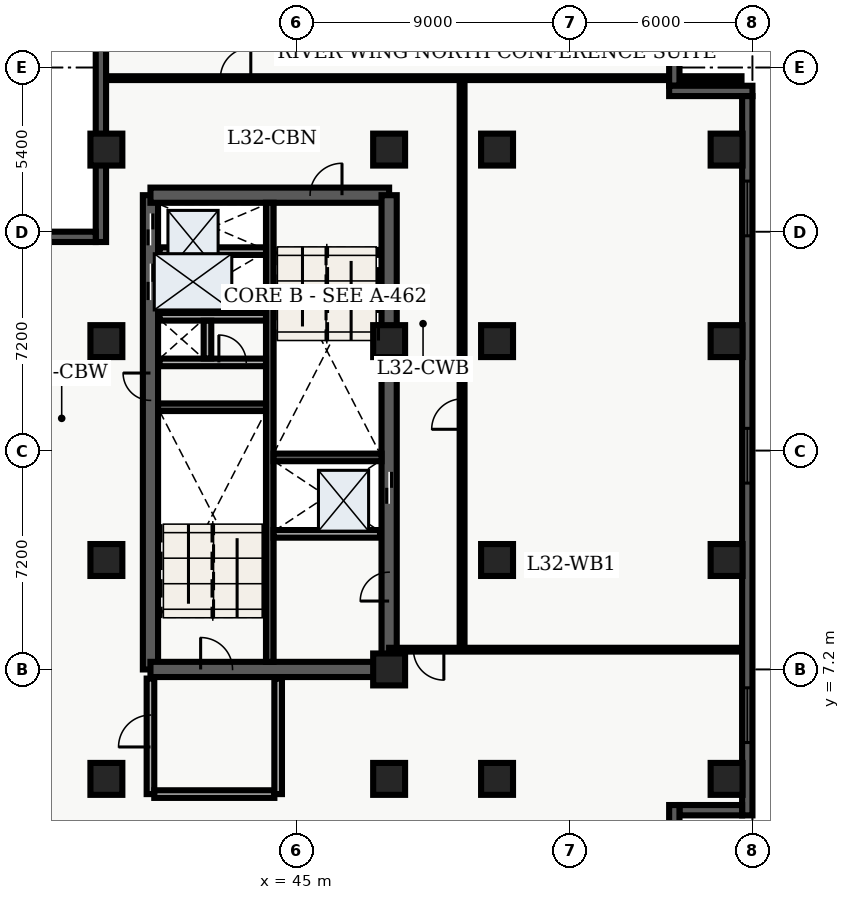
"""IFC4 building model, lengths in metres.
Left out: names, types, materials, properties, quantities, classifications, styles, units other than length and angle.
Written with IfcOpenShell. Run it as: python <this file> out.ifc"""

import sys

from ifc_helpers import new_model, entity, si_unit, converted_unit, direction, frame, origin_with_axes, origin_2d_with_axis, place, context, subcontext, project, spatial, polyline, rectangle, outline, extrude, element, fill, save


model = new_model("IFC4")
c1 = context("Model", 3, precision=1e-05, world=origin_with_axes(), true_north=direction((0.0, 1.0)))
c2 = subcontext(c1, "Body", "Model", "MODEL_VIEW")
j1 = project(units=[si_unit("LENGTHUNIT", "METRE"), converted_unit("PLANEANGLEUNIT", "DEGREE", entity("IfcPlaneAngleMeasure", 0.017), si_unit("PLANEANGLEUNIT", "RADIAN"), dimensions=[0, 0, 0, 0, 0, 0, 0])], contexts=[c1])
p1 = place(None, origin_with_axes())
s1 = spatial("IfcSite", under=j1, at=p1, CompositionType="ELEMENT")
p2 = place(p1, origin_with_axes())
s2 = spatial("IfcBuilding", under=s1, at=p2, CompositionType="ELEMENT")
p3 = place(p2, frame((0.0, 0.0, 132.9), z_axis=(0.0, 0.0, 1.0), x_axis=(1.0, 0.0, 0.0)))
s3 = spatial("IfcBuildingStorey", under=s2, at=p3, CompositionType="ELEMENT", Elevation=132.9)
p4 = place(p3, frame((40.2, 7.2, 0.0), z_axis=(0.0, 0.0, 1.0), x_axis=(0.0, 1.0, 0.0)))
e1 = element("IfcWall", 1, at=p4, inside=s3, PredefinedType="SHEAR", context=c2, shape_type="SweptSolid", body=[
    extrude(outline(polyline([(0.0, -0.25), (15.6, -0.25), (15.6, 0.25), (0.0, 0.25), (0.0, -0.25)])), origin_with_axes(), (0.0, 0.0, 1.0), 3.66),
])
p5 = place(p4, frame((14.475, 0.0, 0.0), z_axis=(0.0, 0.0, 1.0), x_axis=(1.0, 0.0, 0.0)))
e2 = element("IfcOpeningElement", 2, at=p5, cuts=e1, PredefinedType="OPENING", context=c2, shape_type="SweptSolid", body=[
    extrude(rectangle(XDim=1.05, YDim=0.52, at=origin_2d_with_axis()), origin_with_axes(), (0.0, 0.0, 1.0), 2.15),
])
p6 = place(p4, frame((12.75, 0.0, 0.0), z_axis=(0.0, 0.0, 1.0), x_axis=(1.0, 0.0, 0.0)))
e3 = element("IfcOpeningElement", 3, at=p6, cuts=e1, PredefinedType="OPENING", context=c2, shape_type="SweptSolid", body=[
    extrude(rectangle(XDim=1.2, YDim=0.52, at=origin_2d_with_axis()), origin_with_axes(), (0.0, 0.0, 1.0), 2.15),
])
p7 = place(p4, frame((9.3, 0.0, 0.0), z_axis=(0.0, 0.0, 1.0), x_axis=(1.0, 0.0, 0.0)))
e4 = element("IfcOpeningElement", 4, at=p7, cuts=e1, PredefinedType="OPENING", context=c2, shape_type="SweptSolid", body=[
    extrude(rectangle(XDim=0.9, YDim=0.52, at=origin_2d_with_axis()), origin_with_axes(), (0.0, 0.0, 1.0), 2.15),
])
p8 = place(p3, frame((40.2, 7.2, 0.0), z_axis=(0.0, 0.0, 1.0), x_axis=(1.0, 0.0, 0.0)))
e5 = element("IfcWall", 5, at=p8, inside=s3, PredefinedType="SHEAR", context=c2, shape_type="SweptSolid", body=[
    extrude(outline(polyline([(0.0, -0.25), (7.85, -0.25), (7.85, 0.25), (0.0, 0.25), (0.0, -0.25)])), origin_with_axes(), (0.0, 0.0, 1.0), 3.66),
])
p9 = place(p8, frame((2.175, 0.0, 0.0), z_axis=(0.0, 0.0, 1.0), x_axis=(1.0, 0.0, 0.0)))
e6 = element("IfcOpeningElement", 6, at=p9, cuts=e5, PredefinedType="OPENING", context=c2, shape_type="SweptSolid", body=[
    extrude(rectangle(XDim=1.05, YDim=0.52, at=origin_2d_with_axis()), origin_with_axes(), (0.0, 0.0, 1.0), 2.15),
])
p10 = place(p3, frame((40.2, 22.8, 0.0), z_axis=(0.0, 0.0, 1.0), x_axis=(1.0, 0.0, 0.0)))
e7 = element("IfcWall", 7, at=p10, inside=s3, PredefinedType="SHEAR", context=c2, shape_type="SweptSolid", body=[
    extrude(outline(polyline([(0.0, -0.25), (7.85, -0.25), (7.85, 0.25), (0.0, 0.25), (0.0, -0.25)])), origin_with_axes(), (0.0, 0.0, 1.0), 3.66),
])
p11 = place(p10, frame((5.775, 0.0, 0.0), z_axis=(0.0, 0.0, 1.0), x_axis=(1.0, 0.0, 0.0)))
e8 = element("IfcOpeningElement", 8, at=p11, cuts=e7, PredefinedType="OPENING", context=c2, shape_type="SweptSolid", body=[
    extrude(rectangle(XDim=1.05, YDim=0.52, at=origin_2d_with_axis()), origin_with_axes(), (0.0, 0.0, 1.0), 2.15),
])
p12 = place(p3, frame((48.05, 7.2, 0.0), z_axis=(0.0, 0.0, 1.0), x_axis=(0.0, 1.0, 0.0)))
e9 = element("IfcWall", 9, at=p12, inside=s3, PredefinedType="SHEAR", context=c2, shape_type="SweptSolid", body=[
    extrude(outline(polyline([(0.0, -0.25), (15.6, -0.25), (15.6, 0.25), (0.0, 0.25), (0.0, -0.25)])), origin_with_axes(), (0.0, 0.0, 1.0), 3.66),
])
p13 = place(p12, frame((5.975, 0.0, 0.0), z_axis=(0.0, 0.0, 1.0), x_axis=(1.0, 0.0, 0.0)))
e10 = element("IfcOpeningElement", 10, at=p13, cuts=e9, PredefinedType="OPENING", context=c2, shape_type="SweptSolid", body=[
    extrude(rectangle(XDim=1.05, YDim=0.52, at=origin_2d_with_axis()), origin_with_axes(), (0.0, 0.0, 1.0), 2.15),
])
p14 = place(p12, frame((2.725, 0.0, 0.0), z_axis=(0.0, 0.0, 1.0), x_axis=(1.0, 0.0, 0.0)))
e11 = element("IfcOpeningElement", 11, at=p14, cuts=e9, PredefinedType="OPENING", context=c2, shape_type="SweptSolid", body=[
    extrude(rectangle(XDim=0.95, YDim=0.52, at=origin_2d_with_axis()), origin_with_axes(), (0.0, 0.0, 1.0), 2.15),
])
p15 = place(p3, frame((44.125, 7.45, 0.0), z_axis=(0.0, 0.0, 1.0), x_axis=(0.0, 1.0, 0.0)))
e12 = element("IfcWall", 12, at=p15, inside=s3, PredefinedType="SHEAR", context=c2, shape_type="SweptSolid", body=[
    extrude(outline(polyline([(0.0, -0.125), (15.1, -0.125), (15.1, 0.125), (0.0, 0.125), (0.0, -0.125)])), origin_with_axes(), (0.0, 0.0, 1.0), 3.66),
])
for number, where, z_axis, x_axis in (
    (13, (40.45, 15.825, 0.0), (0.0, 0.0, 1.0), (1.0, 0.0, 0.0)),
    (14, (44.25, 14.175, 0.0), (0.0, 0.0, 1.0), (1.0, 0.0, 0.0)),
):
    element("IfcWall", number, at=place(p3, frame(where, z_axis=z_axis, x_axis=x_axis)), inside=s3, PredefinedType="SHEAR", context=c2, shape_type="SweptSolid", body=[
        extrude(outline(polyline([(0.0, -0.125), (3.55, -0.125), (3.55, 0.125), (0.0, 0.125), (0.0, -0.125)])), origin_with_axes(), (0.0, 0.0, 1.0), 3.66),
    ])
p16 = place(p3, frame((40.5, 17.3, 0.0), z_axis=(0.0, 0.0, 1.0), x_axis=(1.0, 0.0, 0.0)))
e15 = element("IfcWall", 15, at=p16, inside=s3, PredefinedType="SOLIDWALL", context=c2, shape_type="SweptSolid", body=[
    extrude(outline(polyline([(0.0, -0.125), (3.5, -0.125), (3.5, 0.125), (0.0, 0.125), (0.0, -0.125)])), origin_with_axes(), (0.0, 0.0, 1.0), 2.7),
])
p17 = place(p16, frame((2.4, 0.0, 0.0), z_axis=(0.0, 0.0, 1.0), x_axis=(1.0, 0.0, 0.0)))
e16 = element("IfcOpeningElement", 16, at=p17, cuts=e15, PredefinedType="OPENING", context=c2, shape_type="SweptSolid", body=[
    extrude(rectangle(XDim=0.9, YDim=0.27, at=origin_2d_with_axis()), origin_with_axes(), (0.0, 0.0, 1.0), 2.15),
])
p18 = place(p3, frame((40.5, 18.8, 0.0), z_axis=(0.0, 0.0, 1.0), x_axis=(1.0, 0.0, 0.0)))
e17 = element("IfcWall", 17, at=p18, inside=s3, PredefinedType="SOLIDWALL", context=c2, shape_type="SweptSolid", body=[
    extrude(outline(polyline([(0.0, -0.125), (3.5, -0.125), (3.5, 0.125), (0.0, 0.125), (0.0, -0.125)])), origin_with_axes(), (0.0, 0.0, 1.0), 2.7),
])
p19 = place(p3, frame((42.075, 17.43, 0.0), z_axis=(0.0, 0.0, 1.0), x_axis=(0.0, 1.0, 0.0)))
e18 = element("IfcWall", 18, at=p19, inside=s3, PredefinedType="SOLIDWALL", context=c2, shape_type="SweptSolid", body=[
    extrude(outline(polyline([(0.0, -0.125), (1.24, -0.125), (1.24, 0.125), (0.0, 0.125), (0.0, -0.125)])), origin_with_axes(), (0.0, 0.0, 1.0), 2.7),
])
p20 = place(p3, frame((40.2, 3.1, 0.0), z_axis=(0.0, 0.0, 1.0), x_axis=(0.0, 1.0, 0.0)))
e19 = element("IfcWall", 19, at=p20, inside=s3, PredefinedType="SOLIDWALL", context=c2, shape_type="SweptSolid", body=[
    extrude(outline(polyline([(0.0, -0.125), (3.8, -0.125), (3.8, 0.125), (0.0, 0.125), (0.0, -0.125)])), origin_with_axes(), (0.0, 0.0, 1.0), 2.7),
])
p21 = place(p20, frame((2.075, 0.0, 0.0), z_axis=(0.0, 0.0, 1.0), x_axis=(1.0, 0.0, 0.0)))
e20 = element("IfcOpeningElement", 20, at=p21, cuts=e19, PredefinedType="OPENING", context=c2, shape_type="SweptSolid", body=[
    extrude(rectangle(XDim=1.05, YDim=0.27, at=origin_2d_with_axis()), origin_with_axes(), (0.0, 0.0, 1.0), 2.15),
])
p22 = place(p3, frame((40.325, 3.1, 0.0), z_axis=(0.0, 0.0, 1.0), x_axis=(1.0, 0.0, 0.0)))
e21 = element("IfcWall", 21, at=p22, inside=s3, PredefinedType="SOLIDWALL", context=c2, shape_type="SweptSolid", body=[
    extrude(outline(polyline([(0.0, -0.125), (3.95, -0.125), (3.95, 0.125), (0.0, 0.125), (0.0, -0.125)])), origin_with_axes(), (0.0, 0.0, 1.0), 2.7),
])
p23 = place(p3, frame((44.4, 3.1, 0.0), z_axis=(0.0, 0.0, 1.0), x_axis=(0.0, 1.0, 0.0)))
e22 = element("IfcWall", 22, at=p23, inside=s3, PredefinedType="SOLIDWALL", context=c2, shape_type="SweptSolid", body=[
    extrude(outline(polyline([(0.0, -0.125), (3.8, -0.125), (3.8, 0.125), (0.0, 0.125), (0.0, -0.125)])), origin_with_axes(), (0.0, 0.0, 1.0), 2.7),
])
for number, where, z_axis, x_axis in (
    (23, (38.75, 3.6, 0.0), (0.0, 0.0, 1.0), (1.0, 0.0, 0.0)),
    (24, (38.75, 10.8, 0.0), (0.0, 0.0, 1.0), (1.0, 0.0, 0.0)),
    (25, (38.75, 18.0, 0.0), (0.0, 0.0, 1.0), (1.0, 0.0, 0.0)),
    (26, (38.75, 24.3, 0.0), (0.0, 0.0, 1.0), (1.0, 0.0, 0.0)),
    (27, (48.05, 3.6, 0.0), (0.0, 0.0, 1.0), (1.0, 0.0, 0.0)),
    (28, (48.05, 7.2, 0.0), (0.0, 0.0, 1.0), (1.0, 0.0, 0.0)),
    (29, (48.05, 18.0, 0.0), (0.0, 0.0, 1.0), (1.0, 0.0, 0.0)),
    (30, (48.05, 24.3, 0.0), (0.0, 0.0, 1.0), (1.0, 0.0, 0.0)),
    (31, (51.6, 3.6, 0.0), (0.0, 0.0, 1.0), (1.0, 0.0, 0.0)),
    (32, (51.6, 10.8, 0.0), (0.0, 0.0, 1.0), (1.0, 0.0, 0.0)),
    (33, (51.6, 18.0, 0.0), (0.0, 0.0, 1.0), (1.0, 0.0, 0.0)),
    (34, (51.6, 24.3, 0.0), (0.0, 0.0, 1.0), (1.0, 0.0, 0.0)),
    (35, (59.15, 3.6, 0.0), (0.0, 0.0, 1.0), (1.0, 0.0, 0.0)),
    (36, (59.15, 10.8, 0.0), (0.0, 0.0, 1.0), (1.0, 0.0, 0.0)),
    (37, (59.15, 18.0, 0.0), (0.0, 0.0, 1.0), (1.0, 0.0, 0.0)),
    (38, (59.15, 24.3, 0.0), (0.0, 0.0, 1.0), (1.0, 0.0, 0.0)),
):
    element("IfcColumn", number, at=place(p3, frame(where, z_axis=z_axis, x_axis=x_axis)), inside=s3, PredefinedType="COLUMN", context=c2, shape_type="SweptSolid", body=[
        extrude(rectangle(XDim=1.05, YDim=1.05, at=origin_2d_with_axis()), origin_with_axes(), (0.0, 0.0, 1.0), 3.9),
    ])
for number, where, z_axis, x_axis in (
    (39, (40.5, 20.96, 0.0), (0.0, 0.0, 1.0), (1.0, 0.0, 0.0)),
    (40, (44.25, 11.66, 0.0), (0.0, 0.0, 1.0), (1.0, 0.0, 0.0)),
):
    element("IfcWall", number, at=place(p3, frame(where, z_axis=z_axis, x_axis=x_axis)), inside=s3, PredefinedType="SOLIDWALL", context=c2, shape_type="SweptSolid", body=[
        extrude(outline(polyline([(0.0, -0.125), (3.5, -0.125), (3.5, 0.125), (0.0, 0.125), (0.0, -0.125)])), origin_with_axes(), (0.0, 0.0, 1.0), 2.7),
    ])
p24 = place(p3, frame((50.45, 7.85, 0.0), z_axis=(0.0, 0.0, 1.0), x_axis=(0.0, 1.0, 0.0)))
e41 = element("IfcWall", 41, at=p24, inside=s3, PredefinedType="PARTITIONING", context=c2, shape_type="SweptSolid", body=[
    extrude(outline(polyline([(0.0, -0.08), (18.8, -0.08), (18.8, 0.08), (0.0, 0.08), (0.0, -0.08)])), origin_with_axes(), (0.0, 0.0, 1.0), 2.7),
])
p25 = place(p24, frame((7.75, 0.0, 0.0), z_axis=(0.0, 0.0, 1.0), x_axis=(1.0, 0.0, 0.0)))
e42 = element("IfcOpeningElement", 42, at=p25, cuts=e41, PredefinedType="OPENING", context=c2, shape_type="SweptSolid", body=[
    extrude(rectangle(XDim=1.0, YDim=0.18, at=origin_2d_with_axis()), origin_with_axes(), (0.0, 0.0, 1.0), 2.15),
])
p26 = place(p3, frame((59.665, 7.85, 0.0), z_axis=(0.0, 0.0, 1.0), x_axis=(-1.0, 0.0, 0.0)))
e43 = element("IfcWall", 43, at=p26, inside=s3, PredefinedType="PARTITIONING", context=c2, shape_type="SweptSolid", body=[
    extrude(outline(polyline([(0.0, -0.062), (11.615, -0.062), (11.615, 0.062), (0.0, 0.062), (0.0, -0.062)])), origin_with_axes(), (0.0, 0.0, 1.0), 2.7),
])
p27 = place(p26, frame((10.315, 0.0, 0.0), z_axis=(0.0, 0.0, 1.0), x_axis=(1.0, 0.0, 0.0)))
e44 = element("IfcOpeningElement", 44, at=p27, cuts=e43, PredefinedType="OPENING", context=c2, shape_type="SweptSolid", body=[
    extrude(rectangle(XDim=1.0, YDim=0.145, at=origin_2d_with_axis()), origin_with_axes(), (0.0, 0.0, 1.0), 2.15),
])
p28 = place(p3, frame((38.735, 26.65, 0.0), z_axis=(0.0, 0.0, 1.0), x_axis=(1.0, 0.0, 0.0)))
e45 = element("IfcWall", 45, at=p28, inside=s3, PredefinedType="PARTITIONING", context=c2, shape_type="SweptSolid", body=[
    extrude(outline(polyline([(0.0, -0.062), (20.905, -0.062), (20.905, 0.062), (0.0, 0.062), (0.0, -0.062)])), origin_with_axes(), (0.0, 0.0, 1.0), 2.7),
])
p29 = place(p28, frame((4.265, 0.0, 0.0), z_axis=(0.0, 0.0, 1.0), x_axis=(1.0, 0.0, 0.0)))
e46 = element("IfcOpeningElement", 46, at=p29, cuts=e45, PredefinedType="OPENING", context=c2, shape_type="SweptSolid", body=[
    extrude(rectangle(XDim=1.0, YDim=0.145, at=origin_2d_with_axis()), origin_with_axes(), (0.0, 0.0, 1.0), 2.15),
])
p30 = place(p3, frame((38.57, 21.26, 0.0), z_axis=(0.0, 0.0, 1.0), x_axis=(0.0, 1.0, 0.0)))
e47 = element("IfcWall", 47, at=p30, inside=s3, PredefinedType="SOLIDWALL", context=c2, shape_type="SweptSolid", body=[
    extrude(outline(polyline([(0.0, -0.17), (7.54, -0.17), (7.54, 0.17), (0.0, 0.17), (0.0, -0.17)])), origin_with_axes(), (0.0, 0.0, 1.0), 3.66),
])
p31 = place(p3, frame((57.43, 28.46, 0.0), z_axis=(0.0, 0.0, 1.0), x_axis=(0.0, -1.0, 0.0)))
e48 = element("IfcWall", 48, at=p31, inside=s3, PredefinedType="SOLIDWALL", context=c2, shape_type="SweptSolid", body=[
    extrude(outline(polyline([(0.0, -0.17), (2.06, -0.17), (2.06, 0.17), (0.0, 0.17), (0.0, -0.17)])), origin_with_axes(), (0.0, 0.0, 1.0), 3.66),
])
p32 = place(p3, frame((57.26, 26.23, 0.0), z_axis=(0.0, 0.0, 1.0), x_axis=(1.0, 0.0, 0.0)))
e49 = element("IfcWall", 49, at=p32, inside=s3, PredefinedType="SOLIDWALL", context=c2, shape_type="SweptSolid", body=[
    extrude(outline(polyline([(0.0, -0.17), (2.74, -0.17), (2.74, 0.17), (0.0, 0.17), (0.0, -0.17)])), origin_with_axes(), (0.0, 0.0, 1.0), 3.66),
])
p33 = place(p3, frame((59.83, 26.06, 0.0), z_axis=(0.0, 0.0, 1.0), x_axis=(0.0, -1.0, 0.0)))
e50 = element("IfcWall", 50, at=p33, inside=s3, PredefinedType="SOLIDWALL", context=c2, shape_type="SweptSolid", body=[
    extrude(outline(polyline([(0.0, -0.17), (23.66, -0.17), (23.66, 0.17), (0.0, 0.17), (0.0, -0.17)])), origin_with_axes(), (0.0, 0.0, 1.0), 3.66),
])
p34 = place(p33, frame((3.696, 0.0, 0.45), z_axis=(0.0, 0.0, 1.0), x_axis=(1.0, 0.0, 0.0)))
e51 = element("IfcOpeningElement", 51, at=p34, cuts=e50, PredefinedType="OPENING", context=c2, shape_type="SweptSolid", body=[
    extrude(rectangle(XDim=1.8, YDim=0.36, at=origin_2d_with_axis()), origin_with_axes(), (0.0, 0.0, 1.0), 2.1),
])
p35 = place(p33, frame((11.83, 0.0, 0.45), z_axis=(0.0, 0.0, 1.0), x_axis=(1.0, 0.0, 0.0)))
e52 = element("IfcOpeningElement", 52, at=p35, cuts=e50, PredefinedType="OPENING", context=c2, shape_type="SweptSolid", body=[
    extrude(rectangle(XDim=1.8, YDim=0.36, at=origin_2d_with_axis()), origin_with_axes(), (0.0, 0.0, 1.0), 2.1),
])
p36 = place(p33, frame((20.364, 0.0, 0.45), z_axis=(0.0, 0.0, 1.0), x_axis=(1.0, 0.0, 0.0)))
e53 = element("IfcOpeningElement", 53, at=p36, cuts=e50, PredefinedType="OPENING", context=c2, shape_type="SweptSolid", body=[
    extrude(rectangle(XDim=1.8, YDim=0.36, at=origin_2d_with_axis()), origin_with_axes(), (0.0, 0.0, 1.0), 2.1),
])
p37 = place(p3, frame((59.66, 2.57, 0.0), z_axis=(0.0, 0.0, 1.0), x_axis=(-1.0, 0.0, 0.0)))
e54 = element("IfcWall", 54, at=p37, inside=s3, PredefinedType="SOLIDWALL", context=c2, shape_type="SweptSolid", body=[
    extrude(outline(polyline([(0.0, -0.17), (2.06, -0.17), (2.06, 0.17), (0.0, 0.17), (0.0, -0.17)])), origin_with_axes(), (0.0, 0.0, 1.0), 3.66),
])
p38 = place(p3, frame((57.43, 2.74, 0.0), z_axis=(0.0, 0.0, 1.0), x_axis=(0.0, -1.0, 0.0)))
e55 = element("IfcWall", 55, at=p38, inside=s3, PredefinedType="SOLIDWALL", context=c2, shape_type="SweptSolid", body=[
    extrude(outline(polyline([(0.0, -0.17), (2.74, -0.17), (2.74, 0.17), (0.0, 0.17), (0.0, -0.17)])), origin_with_axes(), (0.0, 0.0, 1.0), 3.66),
])
p39 = place(p3, frame((21.364, 21.43, 0.0), z_axis=(0.0, 0.0, 1.0), x_axis=(1.0, 0.0, 0.0)))
e56 = element("IfcWall", 56, at=p39, inside=s3, PredefinedType="SOLIDWALL", context=c2, shape_type="SweptSolid", body=[
    extrude(outline(polyline([(0.0, -0.17), (17.036, -0.17), (17.036, 0.17), (0.0, 0.17), (0.0, -0.17)])), origin_with_axes(), (0.0, 0.0, 1.0), 3.66),
])
p40 = place(p39, frame((8.518, 0.0, 0.45), z_axis=(0.0, 0.0, 1.0), x_axis=(1.0, 0.0, 0.0)))
e57 = element("IfcOpeningElement", 57, at=p40, cuts=e56, PredefinedType="OPENING", context=c2, shape_type="SweptSolid", body=[
    extrude(rectangle(XDim=1.8, YDim=0.36, at=origin_2d_with_axis()), origin_with_axes(), (0.0, 0.0, 1.0), 2.1),
])
p41 = place(p39, frame((13.347, 0.0, 0.45), z_axis=(0.0, 0.0, 1.0), x_axis=(1.0, 0.0, 0.0)))
e58 = element("IfcOpeningElement", 58, at=p41, cuts=e56, PredefinedType="OPENING", context=c2, shape_type="SweptSolid", body=[
    extrude(rectangle(XDim=1.8, YDim=0.36, at=origin_2d_with_axis()), origin_with_axes(), (0.0, 0.0, 1.0), 2.1),
])
p42 = place(p12, frame((5.975, 0.0, 0.0), z_axis=(0.0, 0.0, 1.0), x_axis=(1.0, 0.0, 0.0)))
e59 = element("IfcDoor", 59, at=p42, inside=s3, OperationType="SLIDING_TO_LEFT", PredefinedType="DOOR", context=c2, shape_type="SweptSolid", body=[
    extrude(rectangle(XDim=1.05, YDim=0.09, at=origin_2d_with_axis()), origin_with_axes(), (0.0, 0.0, 1.0), 2.15),
])
fill(e10, e59)
p43 = place(p4, frame((14.475, 0.0, 0.0), z_axis=(0.0, 0.0, 1.0), x_axis=(1.0, 0.0, 0.0)))
e60 = element("IfcDoor", 60, at=p43, inside=s3, OperationType="SLIDING_TO_RIGHT", PredefinedType="DOOR", context=c2, shape_type="SweptSolid", body=[
    extrude(rectangle(XDim=1.05, YDim=0.09, at=origin_2d_with_axis()), origin_with_axes(), (0.0, 0.0, 1.0), 2.15),
])
fill(e2, e60)
p44 = place(p4, frame((12.75, 0.0, 0.0), z_axis=(0.0, 0.0, 1.0), x_axis=(1.0, 0.0, 0.0)))
e61 = element("IfcDoor", 61, at=p44, inside=s3, OperationType="DOUBLE_DOOR_SLIDING", PredefinedType="DOOR", context=c2, shape_type="SweptSolid", body=[
    extrude(rectangle(XDim=1.2, YDim=0.09, at=origin_2d_with_axis()), origin_with_axes(), (0.0, 0.0, 1.0), 2.15),
])
fill(e3, e61)
p45 = place(p4, frame((9.3, 0.0, 0.0), z_axis=(0.0, 0.0, 1.0), x_axis=(1.0, 0.0, 0.0)))
e62 = element("IfcDoor", 62, at=p45, inside=s3, OperationType="SINGLE_SWING_RIGHT", PredefinedType="DOOR", context=c2, shape_type="SweptSolid", body=[
    extrude(rectangle(XDim=0.9, YDim=0.09, at=origin_2d_with_axis()), origin_with_axes(), (0.0, 0.0, 1.0), 2.15),
])
fill(e4, e62)
p46 = place(p16, frame((2.4, 0.0, 0.0), z_axis=(0.0, 0.0, 1.0), x_axis=(1.0, 0.0, 0.0)))
e63 = element("IfcDoor", 63, at=p46, inside=s3, OperationType="SINGLE_SWING_LEFT", PredefinedType="DOOR", context=c2, shape_type="SweptSolid", body=[
    extrude(rectangle(XDim=0.9, YDim=0.09, at=origin_2d_with_axis()), origin_with_axes(), (0.0, 0.0, 1.0), 2.15),
])
fill(e16, e63)
p47 = place(p8, frame((2.175, 0.0, 0.0), z_axis=(0.0, 0.0, 1.0), x_axis=(1.0, 0.0, 0.0)))
e64 = element("IfcDoor", 64, at=p47, inside=s3, OperationType="SINGLE_SWING_LEFT", PredefinedType="DOOR", context=c2, shape_type="SweptSolid", body=[
    extrude(rectangle(XDim=1.05, YDim=0.09, at=origin_2d_with_axis()), origin_with_axes(), (0.0, 0.0, 1.0), 2.15),
])
fill(e6, e64)
p48 = place(p10, frame((5.775, 0.0, 0.0), z_axis=(0.0, 0.0, 1.0), x_axis=(1.0, 0.0, 0.0)))
e65 = element("IfcDoor", 65, at=p48, inside=s3, OperationType="SINGLE_SWING_RIGHT", PredefinedType="DOOR", context=c2, shape_type="SweptSolid", body=[
    extrude(rectangle(XDim=1.05, YDim=0.09, at=origin_2d_with_axis()), origin_with_axes(), (0.0, 0.0, 1.0), 2.15),
])
fill(e8, e65)
p49 = place(p20, frame((2.075, 0.0, 0.0), z_axis=(0.0, 0.0, 1.0), x_axis=(1.0, 0.0, 0.0)))
e66 = element("IfcDoor", 66, at=p49, inside=s3, OperationType="SINGLE_SWING_LEFT", PredefinedType="DOOR", context=c2, shape_type="SweptSolid", body=[
    extrude(rectangle(XDim=1.05, YDim=0.09, at=origin_2d_with_axis()), origin_with_axes(), (0.0, 0.0, 1.0), 2.15),
])
fill(e20, e66)
p50 = place(p12, frame((2.725, 0.0, 0.0), z_axis=(0.0, 0.0, 1.0), x_axis=(1.0, 0.0, 0.0)))
e67 = element("IfcDoor", 67, at=p50, inside=s3, OperationType="SINGLE_SWING_LEFT", PredefinedType="DOOR", context=c2, shape_type="SweptSolid", body=[
    extrude(rectangle(XDim=0.95, YDim=0.09, at=origin_2d_with_axis()), origin_with_axes(), (0.0, 0.0, 1.0), 2.15),
])
fill(e11, e67)
p51 = place(p26, frame((10.315, 0.0, 0.0), z_axis=(0.0, 0.0, 1.0), x_axis=(1.0, 0.0, 0.0)))
e68 = element("IfcDoor", 68, at=p51, inside=s3, OperationType="SINGLE_SWING_LEFT", PredefinedType="DOOR", context=c2, shape_type="SweptSolid", body=[
    extrude(rectangle(XDim=1.0, YDim=0.075, at=origin_2d_with_axis()), origin_with_axes(), (0.0, 0.0, 1.0), 2.15),
])
fill(e44, e68)
p52 = place(p28, frame((4.265, 0.0, 0.0), z_axis=(0.0, 0.0, 1.0), x_axis=(1.0, 0.0, 0.0)))
e69 = element("IfcDoor", 69, at=p52, inside=s3, OperationType="SINGLE_SWING_RIGHT", PredefinedType="DOOR", context=c2, shape_type="SweptSolid", body=[
    extrude(rectangle(XDim=1.0, YDim=0.075, at=origin_2d_with_axis()), origin_with_axes(), (0.0, 0.0, 1.0), 2.15),
])
fill(e46, e69)
p53 = place(p24, frame((7.75, 0.0, 0.0), z_axis=(0.0, 0.0, 1.0), x_axis=(1.0, 0.0, 0.0)))
e70 = element("IfcDoor", 70, at=p53, inside=s3, OperationType="SINGLE_SWING_LEFT", PredefinedType="DOOR", context=c2, shape_type="SweptSolid", body=[
    extrude(rectangle(XDim=1.0, YDim=0.09, at=origin_2d_with_axis()), origin_with_axes(), (0.0, 0.0, 1.0), 2.15),
])
fill(e42, e70)
p54 = place(p33, frame((3.696, 0.0, 0.45), z_axis=(0.0, 0.0, 1.0), x_axis=(1.0, 0.0, 0.0)))
e71 = element("IfcWindow", 71, at=p54, inside=s3, PredefinedType="WINDOW", context=c2, shape_type="SweptSolid", body=[
    extrude(rectangle(XDim=1.8, YDim=0.09, at=origin_2d_with_axis()), origin_with_axes(), (0.0, 0.0, 1.0), 2.1),
])
fill(e51, e71)
p55 = place(p33, frame((11.83, 0.0, 0.45), z_axis=(0.0, 0.0, 1.0), x_axis=(1.0, 0.0, 0.0)))
e72 = element("IfcWindow", 72, at=p55, inside=s3, PredefinedType="WINDOW", context=c2, shape_type="SweptSolid", body=[
    extrude(rectangle(XDim=1.8, YDim=0.09, at=origin_2d_with_axis()), origin_with_axes(), (0.0, 0.0, 1.0), 2.1),
])
fill(e52, e72)
p56 = place(p33, frame((20.364, 0.0, 0.45), z_axis=(0.0, 0.0, 1.0), x_axis=(1.0, 0.0, 0.0)))
e73 = element("IfcWindow", 73, at=p56, inside=s3, PredefinedType="WINDOW", context=c2, shape_type="SweptSolid", body=[
    extrude(rectangle(XDim=1.8, YDim=0.09, at=origin_2d_with_axis()), origin_with_axes(), (0.0, 0.0, 1.0), 2.1),
])
fill(e53, e73)
save(model, sys.argv[1])
